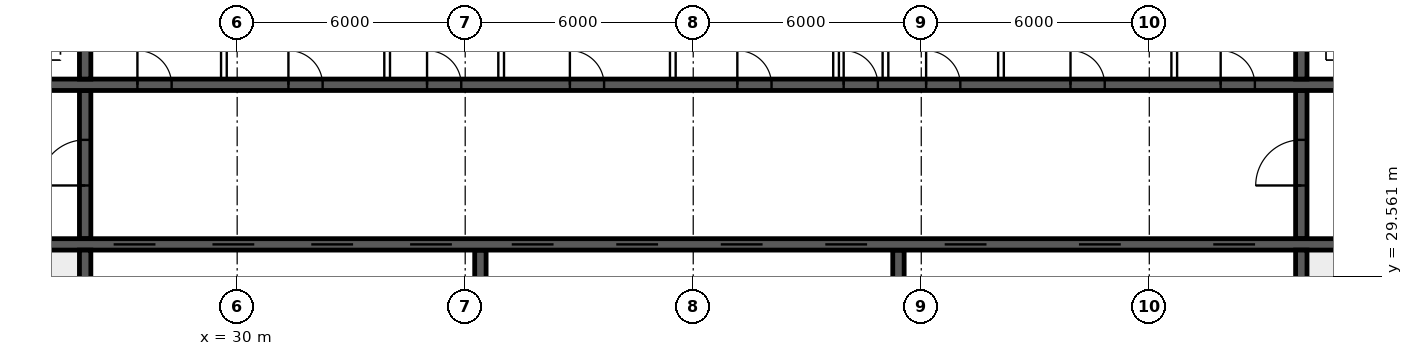
"""IFC4 building model, lengths in metres.
Left out: names, types, materials, properties, quantities, classifications, styles, units other than length and angle.
Written with IfcOpenShell. Run it as: python <this file> out.ifc"""

import sys

from ifc_helpers import new_model, si_unit, direction, frame, frame_2d, origin, place, context, subcontext, project, spatial, rectangle, extrude, element, fill, save


model = new_model("IFC4")
c1 = context("Model", 3, precision=1e-05, world=origin(), true_north=direction((0.0, 1.0)))
c2 = subcontext(c1, "Body", "Model", "MODEL_VIEW")
j1 = project(units=[si_unit("LENGTHUNIT", "METRE"), si_unit("PLANEANGLEUNIT", "RADIAN")], contexts=[c1])
p1 = place(None, origin())
s1 = spatial("IfcSite", under=j1, at=p1, CompositionType="ELEMENT")
p2 = place(p1, origin())
s2 = spatial("IfcBuilding", under=s1, at=p2, CompositionType="ELEMENT")
p3 = place(p2, origin())
s3 = spatial("IfcBuildingStorey", under=s2, at=p3, CompositionType="ELEMENT", Elevation=0.0)
p4 = place(p3, frame((18.5, 30.4, 0.0), z_axis=(0.0, 0.0, 1.0), x_axis=(1.0, 0.0, 0.0)))
e1 = element("IfcWall", 1, at=p4, inside=s3, PredefinedType="SHEAR", context=c2, shape_type="SweptSolid", body=[
    extrude(rectangle(XDim=47.0, YDim=0.3, at=frame_2d((23.5, 0.0))), origin(), (0.0, 0.0, 1.0), 6.0),
])
p5 = place(p4, frame((0.4, 0.0, 0.0)))
e2 = element("IfcOpeningElement", 2, at=p5, cuts=e1, PredefinedType="OPENING", context=c2, shape_type="SweptSolid", body=[
    extrude(rectangle(XDim=1.0, YDim=2.1, at=frame_2d((0.5, 1.05))), frame((0.0, 0.16, 0.0), z_axis=(0.0, -1.0, 0.0), x_axis=(1.0, 0.0, 0.0)), (0.0, 0.0, 1.0), 0.32),
])
p6 = place(p4, frame((45.6, 0.0, 0.0)))
e3 = element("IfcOpeningElement", 3, at=p6, cuts=e1, PredefinedType="OPENING", context=c2, shape_type="SweptSolid", body=[
    extrude(rectangle(XDim=1.0, YDim=2.1, at=frame_2d((0.5, 1.05))), frame((0.0, 0.16, 0.0), z_axis=(0.0, -1.0, 0.0), x_axis=(1.0, 0.0, 0.0)), (0.0, 0.0, 1.0), 0.32),
])
p7 = place(p4, frame((8.25, 0.0, 0.0)))
e4 = element("IfcOpeningElement", 4, at=p7, cuts=e1, PredefinedType="OPENING", context=c2, shape_type="SweptSolid", body=[
    extrude(rectangle(XDim=1.1, YDim=2.1, at=frame_2d((0.55, 1.05))), frame((0.0, 0.16, 0.0), z_axis=(0.0, -1.0, 0.0), x_axis=(1.0, 0.0, 0.0)), (0.0, 0.0, 1.0), 0.32),
])
p8 = place(p4, frame((10.85, 0.0, 0.0)))
e5 = element("IfcOpeningElement", 5, at=p8, cuts=e1, PredefinedType="OPENING", context=c2, shape_type="SweptSolid", body=[
    extrude(rectangle(XDim=1.1, YDim=2.1, at=frame_2d((0.55, 1.05))), frame((0.0, 0.16, 0.0), z_axis=(0.0, -1.0, 0.0), x_axis=(1.0, 0.0, 0.0)), (0.0, 0.0, 1.0), 0.32),
])
p9 = place(p4, frame((13.45, 0.0, 0.0)))
e6 = element("IfcOpeningElement", 6, at=p9, cuts=e1, PredefinedType="OPENING", context=c2, shape_type="SweptSolid", body=[
    extrude(rectangle(XDim=1.1, YDim=2.1, at=frame_2d((0.55, 1.05))), frame((0.0, 0.16, 0.0), z_axis=(0.0, -1.0, 0.0), x_axis=(1.0, 0.0, 0.0)), (0.0, 0.0, 1.0), 0.32),
])
p10 = place(p4, frame((16.05, 0.0, 0.0)))
e7 = element("IfcOpeningElement", 7, at=p10, cuts=e1, PredefinedType="OPENING", context=c2, shape_type="SweptSolid", body=[
    extrude(rectangle(XDim=1.1, YDim=2.1, at=frame_2d((0.55, 1.05))), frame((0.0, 0.16, 0.0), z_axis=(0.0, -1.0, 0.0), x_axis=(1.0, 0.0, 0.0)), (0.0, 0.0, 1.0), 0.32),
])
p11 = place(p4, frame((18.725, 0.0, 0.0)))
e8 = element("IfcOpeningElement", 8, at=p11, cuts=e1, PredefinedType="OPENING", context=c2, shape_type="SweptSolid", body=[
    extrude(rectangle(XDim=1.1, YDim=2.1, at=frame_2d((0.55, 1.05))), frame((0.0, 0.16, 0.0), z_axis=(0.0, -1.0, 0.0), x_axis=(1.0, 0.0, 0.0)), (0.0, 0.0, 1.0), 0.32),
])
p12 = place(p4, frame((21.475, 0.0, 0.0)))
e9 = element("IfcOpeningElement", 9, at=p12, cuts=e1, PredefinedType="OPENING", context=c2, shape_type="SweptSolid", body=[
    extrude(rectangle(XDim=1.1, YDim=2.1, at=frame_2d((0.55, 1.05))), frame((0.0, 0.16, 0.0), z_axis=(0.0, -1.0, 0.0), x_axis=(1.0, 0.0, 0.0)), (0.0, 0.0, 1.0), 0.32),
])
p13 = place(p4, frame((24.225, 0.0, 0.0)))
e10 = element("IfcOpeningElement", 10, at=p13, cuts=e1, PredefinedType="OPENING", context=c2, shape_type="SweptSolid", body=[
    extrude(rectangle(XDim=1.1, YDim=2.1, at=frame_2d((0.55, 1.05))), frame((0.0, 0.16, 0.0), z_axis=(0.0, -1.0, 0.0), x_axis=(1.0, 0.0, 0.0)), (0.0, 0.0, 1.0), 0.32),
])
p14 = place(p4, frame((26.975, 0.0, 0.0)))
e11 = element("IfcOpeningElement", 11, at=p14, cuts=e1, PredefinedType="OPENING", context=c2, shape_type="SweptSolid", body=[
    extrude(rectangle(XDim=1.1, YDim=2.1, at=frame_2d((0.55, 1.05))), frame((0.0, 0.16, 0.0), z_axis=(0.0, -1.0, 0.0), x_axis=(1.0, 0.0, 0.0)), (0.0, 0.0, 1.0), 0.32),
])
p15 = place(p4, frame((30.117, 0.0, 0.0)))
e12 = element("IfcOpeningElement", 12, at=p15, cuts=e1, PredefinedType="OPENING", context=c2, shape_type="SweptSolid", body=[
    extrude(rectangle(XDim=1.1, YDim=2.1, at=frame_2d((0.55, 1.05))), frame((0.0, 0.16, 0.0), z_axis=(0.0, -1.0, 0.0), x_axis=(1.0, 0.0, 0.0)), (0.0, 0.0, 1.0), 0.32),
])
p16 = place(p4, frame((33.65, 0.0, 0.0)))
e13 = element("IfcOpeningElement", 13, at=p16, cuts=e1, PredefinedType="OPENING", context=c2, shape_type="SweptSolid", body=[
    extrude(rectangle(XDim=1.1, YDim=2.1, at=frame_2d((0.55, 1.05))), frame((0.0, 0.16, 0.0), z_axis=(0.0, -1.0, 0.0), x_axis=(1.0, 0.0, 0.0)), (0.0, 0.0, 1.0), 0.32),
])
p17 = place(p4, frame((37.183, 0.0, 0.0)))
e14 = element("IfcOpeningElement", 14, at=p17, cuts=e1, PredefinedType="OPENING", context=c2, shape_type="SweptSolid", body=[
    extrude(rectangle(XDim=1.1, YDim=2.1, at=frame_2d((0.55, 1.05))), frame((0.0, 0.16, 0.0), z_axis=(0.0, -1.0, 0.0), x_axis=(1.0, 0.0, 0.0)), (0.0, 0.0, 1.0), 0.32),
])
p18 = place(p3, frame((18.5, 34.6, 0.0), z_axis=(0.0, 0.0, 1.0), x_axis=(1.0, 0.0, 0.0)))
e15 = element("IfcWall", 15, at=p18, inside=s3, PredefinedType="SHEAR", context=c2, shape_type="SweptSolid", body=[
    extrude(rectangle(XDim=47.0, YDim=0.3, at=frame_2d((23.5, 0.0))), origin(), (0.0, 0.0, 1.0), 6.0),
])
p19 = place(p18, frame((0.9, 0.0, 0.0)))
e16 = element("IfcOpeningElement", 16, at=p19, cuts=e15, PredefinedType="OPENING", context=c2, shape_type="SweptSolid", body=[
    extrude(rectangle(XDim=1.1, YDim=2.1, at=frame_2d((0.55, 1.05))), frame((0.0, 0.16, 0.0), z_axis=(0.0, -1.0, 0.0), x_axis=(1.0, 0.0, 0.0)), (0.0, 0.0, 1.0), 0.32),
])
p20 = place(p18, frame((45.0, 0.0, 0.0)))
e17 = element("IfcOpeningElement", 17, at=p20, cuts=e15, PredefinedType="OPENING", context=c2, shape_type="SweptSolid", body=[
    extrude(rectangle(XDim=1.1, YDim=2.1, at=frame_2d((0.55, 1.05))), frame((0.0, 0.16, 0.0), z_axis=(0.0, -1.0, 0.0), x_axis=(1.0, 0.0, 0.0)), (0.0, 0.0, 1.0), 0.32),
])
p21 = place(p18, frame((4.1, 0.0, 0.0)))
e18 = element("IfcOpeningElement", 18, at=p21, cuts=e15, PredefinedType="OPENING", context=c2, shape_type="SweptSolid", body=[
    extrude(rectangle(XDim=0.9, YDim=2.1, at=frame_2d((0.45, 1.05))), frame((0.0, 0.16, 0.0), z_axis=(0.0, -1.0, 0.0), x_axis=(1.0, 0.0, 0.0)), (0.0, 0.0, 1.0), 0.32),
])
p22 = place(p18, frame((42.0, 0.0, 0.0)))
e19 = element("IfcOpeningElement", 19, at=p22, cuts=e15, PredefinedType="OPENING", context=c2, shape_type="SweptSolid", body=[
    extrude(rectangle(XDim=0.9, YDim=2.1, at=frame_2d((0.45, 1.05))), frame((0.0, 0.16, 0.0), z_axis=(0.0, -1.0, 0.0), x_axis=(1.0, 0.0, 0.0)), (0.0, 0.0, 1.0), 0.32),
])
p23 = place(p18, frame((8.875, 0.0, 0.0)))
e20 = element("IfcOpeningElement", 20, at=p23, cuts=e15, PredefinedType="OPENING", context=c2, shape_type="SweptSolid", body=[
    extrude(rectangle(XDim=0.9, YDim=2.1, at=frame_2d((0.45, 1.05))), frame((0.0, 0.16, 0.0), z_axis=(0.0, -1.0, 0.0), x_axis=(1.0, 0.0, 0.0)), (0.0, 0.0, 1.0), 0.32),
])
p24 = place(p18, frame((12.849, 0.0, 0.0)))
e21 = element("IfcOpeningElement", 21, at=p24, cuts=e15, PredefinedType="OPENING", context=c2, shape_type="SweptSolid", body=[
    extrude(rectangle(XDim=0.9, YDim=2.1, at=frame_2d((0.45, 1.05))), frame((0.0, 0.16, 0.0), z_axis=(0.0, -1.0, 0.0), x_axis=(1.0, 0.0, 0.0)), (0.0, 0.0, 1.0), 0.32),
])
p25 = place(p18, frame((16.496, 0.0, 0.0)))
e22 = element("IfcOpeningElement", 22, at=p25, cuts=e15, PredefinedType="OPENING", context=c2, shape_type="SweptSolid", body=[
    extrude(rectangle(XDim=0.9, YDim=2.1, at=frame_2d((0.45, 1.05))), frame((0.0, 0.16, 0.0), z_axis=(0.0, -1.0, 0.0), x_axis=(1.0, 0.0, 0.0)), (0.0, 0.0, 1.0), 0.32),
])
p26 = place(p18, frame((20.255, 0.0, 0.0)))
e23 = element("IfcOpeningElement", 23, at=p26, cuts=e15, PredefinedType="OPENING", context=c2, shape_type="SweptSolid", body=[
    extrude(rectangle(XDim=0.9, YDim=2.1, at=frame_2d((0.45, 1.05))), frame((0.0, 0.16, 0.0), z_axis=(0.0, -1.0, 0.0), x_axis=(1.0, 0.0, 0.0)), (0.0, 0.0, 1.0), 0.32),
])
p27 = place(p18, frame((24.661, 0.0, 0.0)))
e24 = element("IfcOpeningElement", 24, at=p27, cuts=e15, PredefinedType="OPENING", context=c2, shape_type="SweptSolid", body=[
    extrude(rectangle(XDim=0.9, YDim=2.1, at=frame_2d((0.45, 1.05))), frame((0.0, 0.16, 0.0), z_axis=(0.0, -1.0, 0.0), x_axis=(1.0, 0.0, 0.0)), (0.0, 0.0, 1.0), 0.32),
])
p28 = place(p18, frame((27.458, 0.0, 0.0)))
e25 = element("IfcOpeningElement", 25, at=p28, cuts=e15, PredefinedType="OPENING", context=c2, shape_type="SweptSolid", body=[
    extrude(rectangle(XDim=0.9, YDim=2.1, at=frame_2d((0.45, 1.05))), frame((0.0, 0.16, 0.0), z_axis=(0.0, -1.0, 0.0), x_axis=(1.0, 0.0, 0.0)), (0.0, 0.0, 1.0), 0.32),
])
p29 = place(p18, frame((29.628, 0.0, 0.0)))
e26 = element("IfcOpeningElement", 26, at=p29, cuts=e15, PredefinedType="OPENING", context=c2, shape_type="SweptSolid", body=[
    extrude(rectangle(XDim=0.9, YDim=2.1, at=frame_2d((0.45, 1.05))), frame((0.0, 0.16, 0.0), z_axis=(0.0, -1.0, 0.0), x_axis=(1.0, 0.0, 0.0)), (0.0, 0.0, 1.0), 0.32),
])
p30 = place(p18, frame((33.427, 0.0, 0.0)))
e27 = element("IfcOpeningElement", 27, at=p30, cuts=e15, PredefinedType="OPENING", context=c2, shape_type="SweptSolid", body=[
    extrude(rectangle(XDim=0.9, YDim=2.1, at=frame_2d((0.45, 1.05))), frame((0.0, 0.16, 0.0), z_axis=(0.0, -1.0, 0.0), x_axis=(1.0, 0.0, 0.0)), (0.0, 0.0, 1.0), 0.32),
])
p31 = place(p18, frame((37.378, 0.0, 0.0)))
e28 = element("IfcOpeningElement", 28, at=p31, cuts=e15, PredefinedType="OPENING", context=c2, shape_type="SweptSolid", body=[
    extrude(rectangle(XDim=0.9, YDim=2.1, at=frame_2d((0.45, 1.05))), frame((0.0, 0.16, 0.0), z_axis=(0.0, -1.0, 0.0), x_axis=(1.0, 0.0, 0.0)), (0.0, 0.0, 1.0), 0.32),
])
for number, where, z_axis, x_axis in (
    (29, (26.0, 26.3, 0.0), (0.0, 0.0, 1.0), (0.0, 1.0, 0.0)),
    (30, (58.0, 26.3, 0.0), (0.0, 0.0, 1.0), (0.0, 1.0, 0.0)),
):
    element("IfcWall", number, at=place(p3, frame(where, z_axis=z_axis, x_axis=x_axis)), inside=s3, PredefinedType="SHEAR", context=c2, shape_type="SweptSolid", body=[
        extrude(rectangle(XDim=3.95, YDim=0.3, at=frame_2d((1.975, 0.0))), origin(), (0.0, 0.0, 1.0), 6.0),
    ])
p32 = place(p3, frame((26.0, 30.55, 0.0), z_axis=(0.0, 0.0, 1.0), x_axis=(0.0, 1.0, 0.0)))
e31 = element("IfcWall", 31, at=p32, inside=s3, PredefinedType="SHEAR", context=c2, shape_type="SweptSolid", body=[
    extrude(rectangle(XDim=3.9, YDim=0.3, at=frame_2d((1.95, 0.0))), origin(), (0.0, 0.0, 1.0), 6.0),
])
p33 = place(p32, frame((1.4, 0.0, 0.0)))
e32 = element("IfcOpeningElement", 32, at=p33, cuts=e31, PredefinedType="OPENING", context=c2, shape_type="SweptSolid", body=[
    extrude(rectangle(XDim=1.2, YDim=2.1, at=frame_2d((0.6, 1.05))), frame((0.0, 0.16, 0.0), z_axis=(0.0, -1.0, 0.0), x_axis=(1.0, 0.0, 0.0)), (0.0, 0.0, 1.0), 0.32),
])
p34 = place(p3, frame((58.0, 30.55, 0.0), z_axis=(0.0, 0.0, 1.0), x_axis=(0.0, 1.0, 0.0)))
e33 = element("IfcWall", 33, at=p34, inside=s3, PredefinedType="SHEAR", context=c2, shape_type="SweptSolid", body=[
    extrude(rectangle(XDim=3.9, YDim=0.3, at=frame_2d((1.95, 0.0))), origin(), (0.0, 0.0, 1.0), 6.0),
])
p35 = place(p34, frame((1.4, 0.0, 0.0)))
e34 = element("IfcOpeningElement", 34, at=p35, cuts=e33, PredefinedType="OPENING", context=c2, shape_type="SweptSolid", body=[
    extrude(rectangle(XDim=1.2, YDim=2.1, at=frame_2d((0.6, 1.05))), frame((0.0, 0.16, 0.0), z_axis=(0.0, -1.0, 0.0), x_axis=(1.0, 0.0, 0.0)), (0.0, 0.0, 1.0), 0.32),
])
for number, where, z_axis, x_axis in (
    (35, (26.0, 34.75, 0.0), (0.0, 0.0, 1.0), (0.0, 1.0, 0.0)),
    (36, (58.0, 34.75, 0.0), (0.0, 0.0, 1.0), (0.0, 1.0, 0.0)),
):
    element("IfcWall", number, at=place(p3, frame(where, z_axis=z_axis, x_axis=x_axis)), inside=s3, PredefinedType="SHEAR", context=c2, shape_type="SweptSolid", body=[
        extrude(rectangle(XDim=2.95, YDim=0.3, at=frame_2d((1.475, 0.0))), origin(), (0.0, 0.0, 1.0), 6.0),
    ])
for number, where, z_axis, x_axis in (
    (37, (36.4, 26.3, 0.0), (0.0, 0.0, 1.0), (0.0, 1.0, 0.0)),
    (38, (47.4, 26.3, 0.0), (0.0, 0.0, 1.0), (0.0, 1.0, 0.0)),
):
    element("IfcWall", number, at=place(p3, frame(where, z_axis=z_axis, x_axis=x_axis)), inside=s3, PredefinedType="SHEAR", context=c2, shape_type="SweptSolid", body=[
        extrude(rectangle(XDim=3.95, YDim=0.3, at=frame_2d((1.975, 0.0))), origin(), (0.0, 0.0, 1.0), 6.0),
    ])
for number, where, z_axis, x_axis in (
    (39, (29.651, 34.75, 0.0), (0.0, 0.0, 1.0), (0.0, 1.0, 0.0)),
    (40, (33.946, 34.75, 0.0), (0.0, 0.0, 1.0), (0.0, 1.0, 0.0)),
    (41, (36.946, 34.75, 0.0), (0.0, 0.0, 1.0), (0.0, 1.0, 0.0)),
    (42, (41.463, 34.75, 0.0), (0.0, 0.0, 1.0), (0.0, 1.0, 0.0)),
    (43, (45.758, 34.75, 0.0), (0.0, 0.0, 1.0), (0.0, 1.0, 0.0)),
    (44, (47.058, 34.75, 0.0), (0.0, 0.0, 1.0), (0.0, 1.0, 0.0)),
    (45, (50.098, 34.75, 0.0), (0.0, 0.0, 1.0), (0.0, 1.0, 0.0)),
    (46, (54.657, 34.75, 0.0), (0.0, 0.0, 1.0), (0.0, 1.0, 0.0)),
):
    element("IfcWall", number, at=place(p3, frame(where, z_axis=z_axis, x_axis=x_axis)), inside=s3, PredefinedType="SOLIDWALL", context=c2, shape_type="SweptSolid", body=[
        extrude(rectangle(XDim=2.95, YDim=0.15, at=frame_2d((1.475, 0.0))), origin(), (0.0, 0.0, 1.0), 5.65),
    ])
p36 = place(p33, origin())
e47 = element("IfcDoor", 47, at=p36, inside=s3, OperationType="SINGLE_SWING_LEFT", PredefinedType="DOOR", context=c2, shape_type="SweptSolid", body=[
    extrude(rectangle(XDim=1.2, YDim=2.1, at=frame_2d((0.6, 1.05))), frame((0.0, 0.025, 0.0), z_axis=(0.0, -1.0, 0.0), x_axis=(1.0, 0.0, 0.0)), (0.0, 0.0, 1.0), 0.05),
])
fill(e32, e47)
p37 = place(p35, origin())
e48 = element("IfcDoor", 48, at=p37, inside=s3, OperationType="SINGLE_SWING_LEFT", PredefinedType="DOOR", context=c2, shape_type="SweptSolid", body=[
    extrude(rectangle(XDim=1.2, YDim=2.1, at=frame_2d((0.6, 1.05))), frame((0.0, 0.025, 0.0), z_axis=(0.0, -1.0, 0.0), x_axis=(1.0, 0.0, 0.0)), (0.0, 0.0, 1.0), 0.05),
])
fill(e34, e48)
p38 = place(p23, origin())
e49 = element("IfcDoor", 49, at=p38, inside=s3, OperationType="SINGLE_SWING_LEFT", PredefinedType="DOOR", context=c2, shape_type="SweptSolid", body=[
    extrude(rectangle(XDim=0.9, YDim=2.1, at=frame_2d((0.45, 1.05))), frame((0.0, 0.025, 0.0), z_axis=(0.0, -1.0, 0.0), x_axis=(1.0, 0.0, 0.0)), (0.0, 0.0, 1.0), 0.05),
])
fill(e20, e49)
p39 = place(p24, origin())
e50 = element("IfcDoor", 50, at=p39, inside=s3, OperationType="SINGLE_SWING_LEFT", PredefinedType="DOOR", context=c2, shape_type="SweptSolid", body=[
    extrude(rectangle(XDim=0.9, YDim=2.1, at=frame_2d((0.45, 1.05))), frame((0.0, 0.025, 0.0), z_axis=(0.0, -1.0, 0.0), x_axis=(1.0, 0.0, 0.0)), (0.0, 0.0, 1.0), 0.05),
])
fill(e21, e50)
p40 = place(p25, origin())
e51 = element("IfcDoor", 51, at=p40, inside=s3, OperationType="SINGLE_SWING_LEFT", PredefinedType="DOOR", context=c2, shape_type="SweptSolid", body=[
    extrude(rectangle(XDim=0.9, YDim=2.1, at=frame_2d((0.45, 1.05))), frame((0.0, 0.025, 0.0), z_axis=(0.0, -1.0, 0.0), x_axis=(1.0, 0.0, 0.0)), (0.0, 0.0, 1.0), 0.05),
])
fill(e22, e51)
p41 = place(p26, origin())
e52 = element("IfcDoor", 52, at=p41, inside=s3, OperationType="SINGLE_SWING_LEFT", PredefinedType="DOOR", context=c2, shape_type="SweptSolid", body=[
    extrude(rectangle(XDim=0.9, YDim=2.1, at=frame_2d((0.45, 1.05))), frame((0.0, 0.025, 0.0), z_axis=(0.0, -1.0, 0.0), x_axis=(1.0, 0.0, 0.0)), (0.0, 0.0, 1.0), 0.05),
])
fill(e23, e52)
p42 = place(p27, origin())
e53 = element("IfcDoor", 53, at=p42, inside=s3, OperationType="SINGLE_SWING_LEFT", PredefinedType="DOOR", context=c2, shape_type="SweptSolid", body=[
    extrude(rectangle(XDim=0.9, YDim=2.1, at=frame_2d((0.45, 1.05))), frame((0.0, 0.025, 0.0), z_axis=(0.0, -1.0, 0.0), x_axis=(1.0, 0.0, 0.0)), (0.0, 0.0, 1.0), 0.05),
])
fill(e24, e53)
p43 = place(p28, origin())
e54 = element("IfcDoor", 54, at=p43, inside=s3, OperationType="SINGLE_SWING_LEFT", PredefinedType="DOOR", context=c2, shape_type="SweptSolid", body=[
    extrude(rectangle(XDim=0.9, YDim=2.1, at=frame_2d((0.45, 1.05))), frame((0.0, 0.025, 0.0), z_axis=(0.0, -1.0, 0.0), x_axis=(1.0, 0.0, 0.0)), (0.0, 0.0, 1.0), 0.05),
])
fill(e25, e54)
p44 = place(p29, origin())
e55 = element("IfcDoor", 55, at=p44, inside=s3, OperationType="SINGLE_SWING_LEFT", PredefinedType="DOOR", context=c2, shape_type="SweptSolid", body=[
    extrude(rectangle(XDim=0.9, YDim=2.1, at=frame_2d((0.45, 1.05))), frame((0.0, 0.025, 0.0), z_axis=(0.0, -1.0, 0.0), x_axis=(1.0, 0.0, 0.0)), (0.0, 0.0, 1.0), 0.05),
])
fill(e26, e55)
p45 = place(p30, origin())
e56 = element("IfcDoor", 56, at=p45, inside=s3, OperationType="SINGLE_SWING_LEFT", PredefinedType="DOOR", context=c2, shape_type="SweptSolid", body=[
    extrude(rectangle(XDim=0.9, YDim=2.1, at=frame_2d((0.45, 1.05))), frame((0.0, 0.025, 0.0), z_axis=(0.0, -1.0, 0.0), x_axis=(1.0, 0.0, 0.0)), (0.0, 0.0, 1.0), 0.05),
])
fill(e27, e56)
p46 = place(p31, origin())
e57 = element("IfcDoor", 57, at=p46, inside=s3, OperationType="SINGLE_SWING_LEFT", PredefinedType="DOOR", context=c2, shape_type="SweptSolid", body=[
    extrude(rectangle(XDim=0.9, YDim=2.1, at=frame_2d((0.45, 1.05))), frame((0.0, 0.025, 0.0), z_axis=(0.0, -1.0, 0.0), x_axis=(1.0, 0.0, 0.0)), (0.0, 0.0, 1.0), 0.05),
])
fill(e28, e57)
p47 = place(p7, origin())
e58 = element("IfcDoor", 58, at=p47, inside=s3, OperationType="DOUBLE_DOOR_SLIDING", PredefinedType="DOOR", context=c2, shape_type="SweptSolid", body=[
    extrude(rectangle(XDim=1.1, YDim=2.1, at=frame_2d((0.55, 1.05))), frame((0.0, 0.025, 0.0), z_axis=(0.0, -1.0, 0.0), x_axis=(1.0, 0.0, 0.0)), (0.0, 0.0, 1.0), 0.05),
])
fill(e4, e58)
p48 = place(p8, origin())
e59 = element("IfcDoor", 59, at=p48, inside=s3, OperationType="DOUBLE_DOOR_SLIDING", PredefinedType="DOOR", context=c2, shape_type="SweptSolid", body=[
    extrude(rectangle(XDim=1.1, YDim=2.1, at=frame_2d((0.55, 1.05))), frame((0.0, 0.025, 0.0), z_axis=(0.0, -1.0, 0.0), x_axis=(1.0, 0.0, 0.0)), (0.0, 0.0, 1.0), 0.05),
])
fill(e5, e59)
p49 = place(p9, origin())
e60 = element("IfcDoor", 60, at=p49, inside=s3, OperationType="DOUBLE_DOOR_SLIDING", PredefinedType="DOOR", context=c2, shape_type="SweptSolid", body=[
    extrude(rectangle(XDim=1.1, YDim=2.1, at=frame_2d((0.55, 1.05))), frame((0.0, 0.025, 0.0), z_axis=(0.0, -1.0, 0.0), x_axis=(1.0, 0.0, 0.0)), (0.0, 0.0, 1.0), 0.05),
])
fill(e6, e60)
p50 = place(p10, origin())
e61 = element("IfcDoor", 61, at=p50, inside=s3, OperationType="DOUBLE_DOOR_SLIDING", PredefinedType="DOOR", context=c2, shape_type="SweptSolid", body=[
    extrude(rectangle(XDim=1.1, YDim=2.1, at=frame_2d((0.55, 1.05))), frame((0.0, 0.025, 0.0), z_axis=(0.0, -1.0, 0.0), x_axis=(1.0, 0.0, 0.0)), (0.0, 0.0, 1.0), 0.05),
])
fill(e7, e61)
p51 = place(p11, origin())
e62 = element("IfcDoor", 62, at=p51, inside=s3, OperationType="DOUBLE_DOOR_SLIDING", PredefinedType="DOOR", context=c2, shape_type="SweptSolid", body=[
    extrude(rectangle(XDim=1.1, YDim=2.1, at=frame_2d((0.55, 1.05))), frame((0.0, 0.025, 0.0), z_axis=(0.0, -1.0, 0.0), x_axis=(1.0, 0.0, 0.0)), (0.0, 0.0, 1.0), 0.05),
])
fill(e8, e62)
p52 = place(p12, origin())
e63 = element("IfcDoor", 63, at=p52, inside=s3, OperationType="DOUBLE_DOOR_SLIDING", PredefinedType="DOOR", context=c2, shape_type="SweptSolid", body=[
    extrude(rectangle(XDim=1.1, YDim=2.1, at=frame_2d((0.55, 1.05))), frame((0.0, 0.025, 0.0), z_axis=(0.0, -1.0, 0.0), x_axis=(1.0, 0.0, 0.0)), (0.0, 0.0, 1.0), 0.05),
])
fill(e9, e63)
p53 = place(p13, origin())
e64 = element("IfcDoor", 64, at=p53, inside=s3, OperationType="DOUBLE_DOOR_SLIDING", PredefinedType="DOOR", context=c2, shape_type="SweptSolid", body=[
    extrude(rectangle(XDim=1.1, YDim=2.1, at=frame_2d((0.55, 1.05))), frame((0.0, 0.025, 0.0), z_axis=(0.0, -1.0, 0.0), x_axis=(1.0, 0.0, 0.0)), (0.0, 0.0, 1.0), 0.05),
])
fill(e10, e64)
p54 = place(p14, origin())
e65 = element("IfcDoor", 65, at=p54, inside=s3, OperationType="DOUBLE_DOOR_SLIDING", PredefinedType="DOOR", context=c2, shape_type="SweptSolid", body=[
    extrude(rectangle(XDim=1.1, YDim=2.1, at=frame_2d((0.55, 1.05))), frame((0.0, 0.025, 0.0), z_axis=(0.0, -1.0, 0.0), x_axis=(1.0, 0.0, 0.0)), (0.0, 0.0, 1.0), 0.05),
])
fill(e11, e65)
p55 = place(p15, origin())
e66 = element("IfcDoor", 66, at=p55, inside=s3, OperationType="DOUBLE_DOOR_SLIDING", PredefinedType="DOOR", context=c2, shape_type="SweptSolid", body=[
    extrude(rectangle(XDim=1.1, YDim=2.1, at=frame_2d((0.55, 1.05))), frame((0.0, 0.025, 0.0), z_axis=(0.0, -1.0, 0.0), x_axis=(1.0, 0.0, 0.0)), (0.0, 0.0, 1.0), 0.05),
])
fill(e12, e66)
p56 = place(p16, origin())
e67 = element("IfcDoor", 67, at=p56, inside=s3, OperationType="DOUBLE_DOOR_SLIDING", PredefinedType="DOOR", context=c2, shape_type="SweptSolid", body=[
    extrude(rectangle(XDim=1.1, YDim=2.1, at=frame_2d((0.55, 1.05))), frame((0.0, 0.025, 0.0), z_axis=(0.0, -1.0, 0.0), x_axis=(1.0, 0.0, 0.0)), (0.0, 0.0, 1.0), 0.05),
])
fill(e13, e67)
p57 = place(p17, origin())
e68 = element("IfcDoor", 68, at=p57, inside=s3, OperationType="DOUBLE_DOOR_SLIDING", PredefinedType="DOOR", context=c2, shape_type="SweptSolid", body=[
    extrude(rectangle(XDim=1.1, YDim=2.1, at=frame_2d((0.55, 1.05))), frame((0.0, 0.025, 0.0), z_axis=(0.0, -1.0, 0.0), x_axis=(1.0, 0.0, 0.0)), (0.0, 0.0, 1.0), 0.05),
])
fill(e14, e68)
save(model, sys.argv[1])
